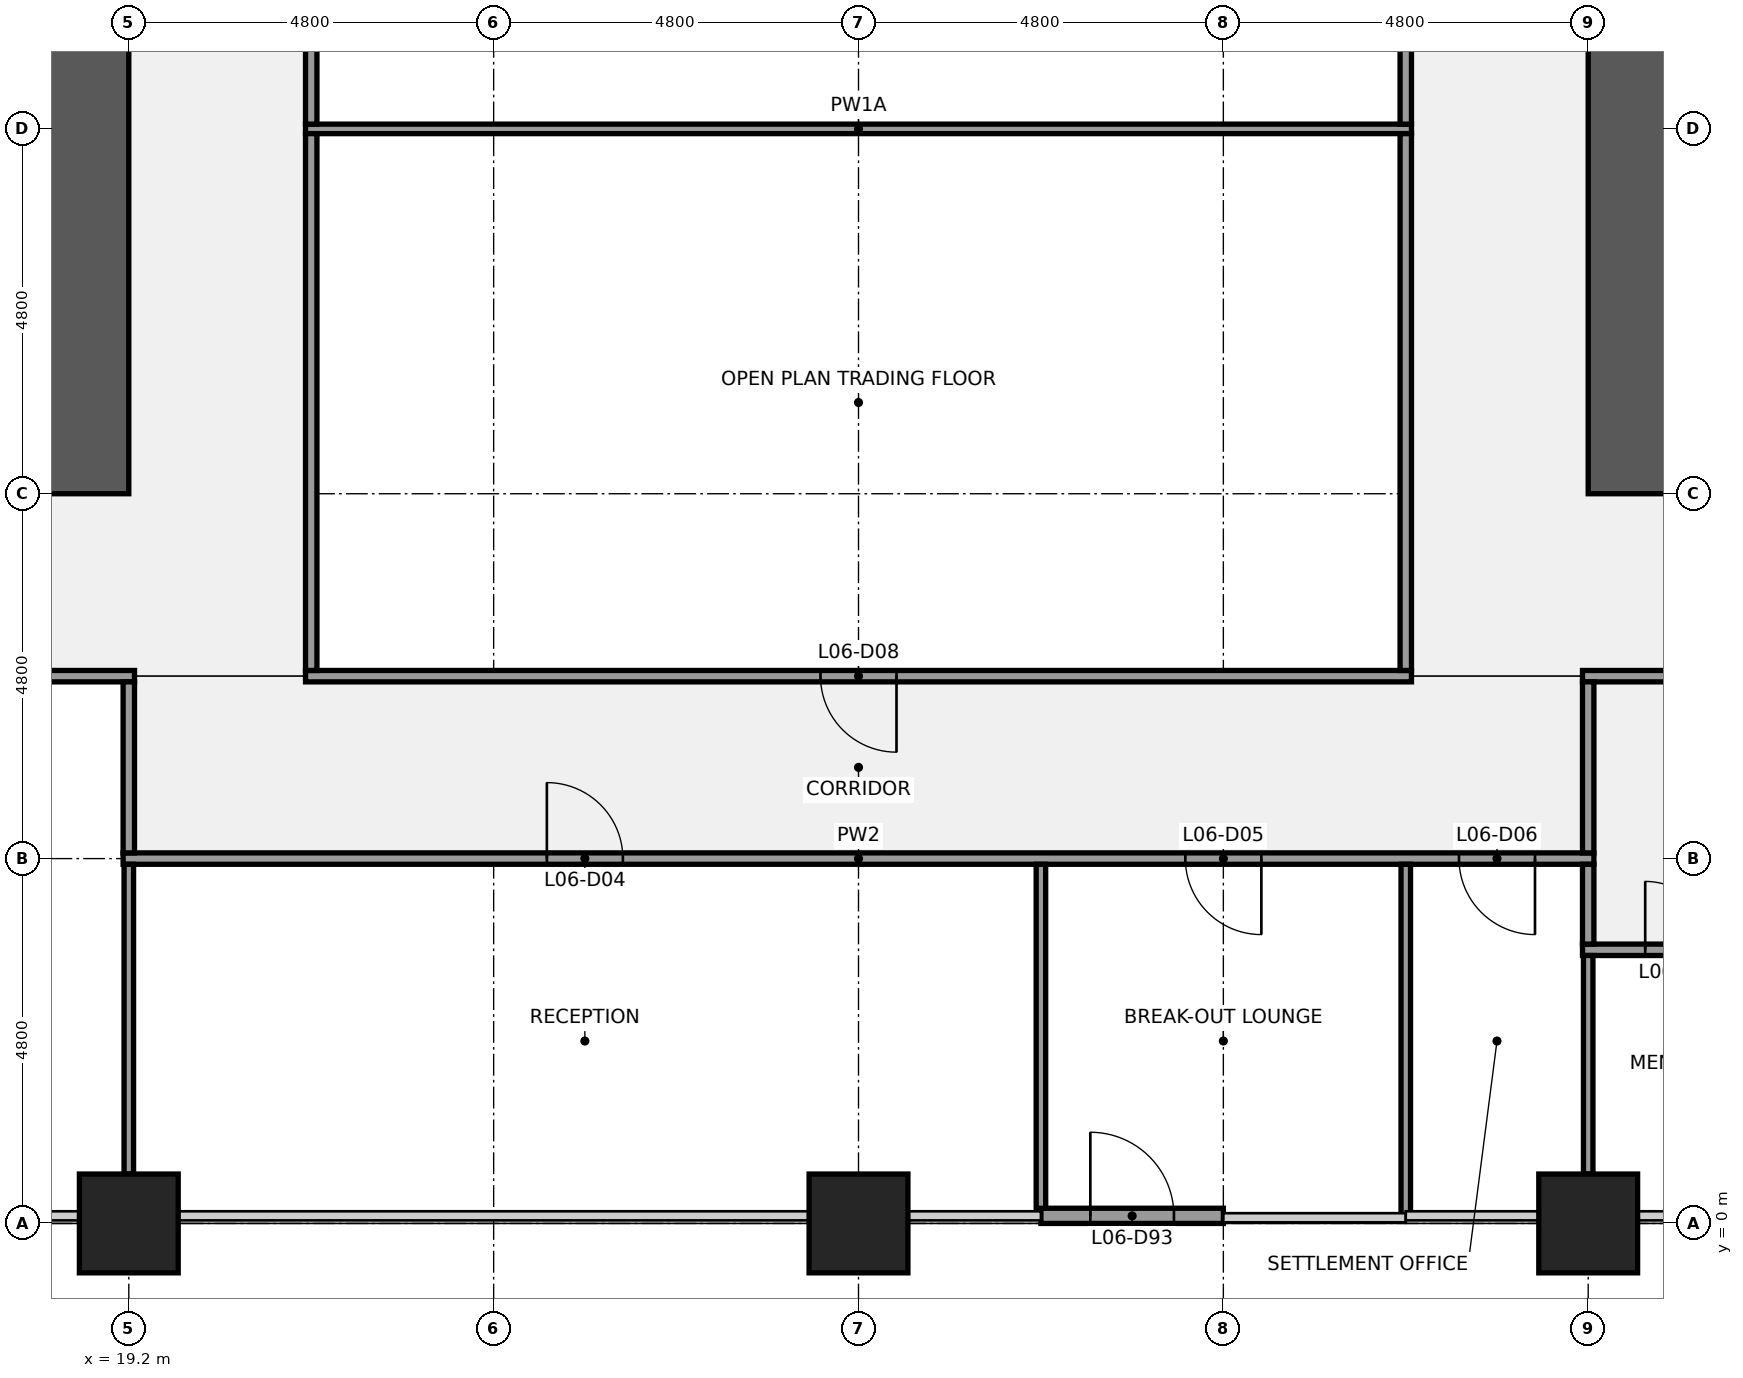
"""IFC4 building model, lengths in metres.
Left out: names, types, materials, properties, quantities, classifications, styles, units other than length and angle.
Written with IfcOpenShell. Run it as: python <this file> out.ifc"""

import sys

from ifc_helpers import new_model, si_unit, direction, frame, frame_2d, origin, origin_2d, place, context, subcontext, project, spatial, rectangle, extrude, element, fill, save


model = new_model("IFC4")
c1 = context("Model", 3, precision=1e-05, world=origin(), true_north=direction((0.0, 1.0)))
c2 = subcontext(c1, "Body", "Model", "MODEL_VIEW")
j1 = project(units=[si_unit("LENGTHUNIT", "METRE"), si_unit("PLANEANGLEUNIT", "RADIAN")], contexts=[c1])
p1 = place(None, origin())
s1 = spatial("IfcSite", under=j1, at=p1, CompositionType="ELEMENT")
p2 = place(p1, origin())
s2 = spatial("IfcBuilding", under=s1, at=p2, CompositionType="ELEMENT")
p3 = place(p2, frame((0.0, 0.0, 34.6)))
s3 = spatial("IfcBuildingStorey", under=s2, at=p3, CompositionType="ELEMENT", Elevation=34.6)
for number, where, z_axis, x_axis in (
    (1, (19.2, 0.0, 0.0), (0.0, 0.0, 1.0), (1.0, 0.0, 0.0)),
    (2, (28.8, 0.0, 0.0), (0.0, 0.0, 1.0), (1.0, 0.0, 0.0)),
    (3, (38.4, 0.0, 0.0), (0.0, 0.0, 1.0), (1.0, 0.0, 0.0)),
):
    element("IfcColumn", number, at=place(p3, frame(where, z_axis=z_axis, x_axis=x_axis)), inside=s3, PredefinedType="COLUMN", context=c2, shape_type="SweptSolid", body=[
        extrude(rectangle(XDim=1.3, YDim=1.3, at=origin_2d()), origin(), (0.0, 0.0, 1.0), 4.4),
    ])
p4 = place(p3, frame((18.6, 38.4, 0.0), z_axis=(0.0, 0.0, 1.0), x_axis=(0.0, -1.0, 0.0)))
e4 = element("IfcWall", 4, at=p4, inside=s3, PredefinedType="SHEAR", context=c2, shape_type="SweptSolid", body=[
    extrude(rectangle(XDim=28.8, YDim=1.2, at=frame_2d((14.4, 0.0))), origin(), (0.0, 0.0, 1.0), 4.24),
])
p5 = place(p4, frame((18.3, 0.0, 0.0)))
e5 = element("IfcOpeningElement", 5, at=p5, cuts=e4, PredefinedType="OPENING", context=c2, shape_type="SweptSolid", body=[
    extrude(rectangle(XDim=1.8, YDim=2.1, at=frame_2d((0.9, 1.05))), frame((0.0, 0.61, 0.0), z_axis=(0.0, -1.0, 0.0), x_axis=(1.0, 0.0, 0.0)), (0.0, 0.0, 1.0), 1.22),
])
p6 = place(p4, frame((8.7, 0.0, 0.0)))
e6 = element("IfcOpeningElement", 6, at=p6, cuts=e4, PredefinedType="OPENING", context=c2, shape_type="SweptSolid", body=[
    extrude(rectangle(XDim=1.8, YDim=2.1, at=frame_2d((0.9, 1.05))), frame((0.0, 0.61, 0.0), z_axis=(0.0, -1.0, 0.0), x_axis=(1.0, 0.0, 0.0)), (0.0, 0.0, 1.0), 1.22),
])
p7 = place(p3, frame((39.0, 9.6, 0.0), z_axis=(0.0, 0.0, 1.0), x_axis=(0.0, 1.0, 0.0)))
e7 = element("IfcWall", 7, at=p7, inside=s3, PredefinedType="SHEAR", context=c2, shape_type="SweptSolid", body=[
    extrude(rectangle(XDim=28.8, YDim=1.2, at=frame_2d((14.4, 0.0))), origin(), (0.0, 0.0, 1.0), 4.24),
])
p8 = place(p7, frame((8.7, 0.0, 0.0)))
e8 = element("IfcOpeningElement", 8, at=p8, cuts=e7, PredefinedType="OPENING", context=c2, shape_type="SweptSolid", body=[
    extrude(rectangle(XDim=1.8, YDim=2.1, at=frame_2d((0.9, 1.05))), frame((0.0, 0.61, 0.0), z_axis=(0.0, -1.0, 0.0), x_axis=(1.0, 0.0, 0.0)), (0.0, 0.0, 1.0), 1.22),
])
p9 = place(p7, frame((18.3, 0.0, 0.0)))
e9 = element("IfcOpeningElement", 9, at=p9, cuts=e7, PredefinedType="OPENING", context=c2, shape_type="SweptSolid", body=[
    extrude(rectangle(XDim=1.8, YDim=2.1, at=frame_2d((0.9, 1.05))), frame((0.0, 0.61, 0.0), z_axis=(0.0, -1.0, 0.0), x_axis=(1.0, 0.0, 0.0)), (0.0, 0.0, 1.0), 1.22),
])
p10 = place(p3, frame((38.325, 3.6, 0.0), z_axis=(0.0, 0.0, 1.0), x_axis=(1.0, 0.0, 0.0)))
e10 = element("IfcWall", 10, at=p10, inside=s3, PredefinedType="PARTITIONING", context=c2, shape_type="SweptSolid", body=[
    extrude(rectangle(XDim=7.35, YDim=0.15, at=frame_2d((3.675, 0.0))), origin(), (0.0, 0.0, 1.0), 3.27),
])
p11 = place(p10, frame((0.825, 0.0, 0.0)))
e11 = element("IfcOpeningElement", 11, at=p11, cuts=e10, PredefinedType="OPENING", context=c2, shape_type="SweptSolid", body=[
    extrude(rectangle(XDim=0.9, YDim=2.1, at=frame_2d((0.45, 1.05))), frame((0.0, 0.085, 0.0), z_axis=(0.0, -1.0, 0.0), x_axis=(1.0, 0.0, 0.0)), (0.0, 0.0, 1.0), 0.17),
])
p12 = place(p10, frame((3.225, 0.0, 0.0)))
e12 = element("IfcOpeningElement", 12, at=p12, cuts=e10, PredefinedType="OPENING", context=c2, shape_type="SweptSolid", body=[
    extrude(rectangle(XDim=0.9, YDim=2.1, at=frame_2d((0.45, 1.05))), frame((0.0, 0.085, 0.0), z_axis=(0.0, -1.0, 0.0), x_axis=(1.0, 0.0, 0.0)), (0.0, 0.0, 1.0), 0.17),
])
p13 = place(p10, frame((5.475, 0.0, 0.0)))
e13 = element("IfcOpeningElement", 13, at=p13, cuts=e10, PredefinedType="OPENING", context=c2, shape_type="SweptSolid", body=[
    extrude(rectangle(XDim=1.2, YDim=2.1, at=frame_2d((0.6, 1.05))), frame((0.0, 0.085, 0.0), z_axis=(0.0, -1.0, 0.0), x_axis=(1.0, 0.0, 0.0)), (0.0, 0.0, 1.0), 0.17),
])
p14 = place(p3, frame((19.125, 4.8, 0.0), z_axis=(0.0, 0.0, 1.0), x_axis=(1.0, 0.0, 0.0)))
e14 = element("IfcWall", 14, at=p14, inside=s3, PredefinedType="PARTITIONING", context=c2, shape_type="SweptSolid", body=[
    extrude(rectangle(XDim=19.35, YDim=0.15, at=frame_2d((9.675, 0.0))), origin(), (0.0, 0.0, 1.0), 3.27),
])
p15 = place(p14, frame((5.575, 0.0, 0.0)))
e15 = element("IfcOpeningElement", 15, at=p15, cuts=e14, PredefinedType="OPENING", context=c2, shape_type="SweptSolid", body=[
    extrude(rectangle(XDim=1.0, YDim=2.1, at=frame_2d((0.5, 1.05))), frame((0.0, 0.085, 0.0), z_axis=(0.0, -1.0, 0.0), x_axis=(1.0, 0.0, 0.0)), (0.0, 0.0, 1.0), 0.17),
])
p16 = place(p14, frame((13.975, 0.0, 0.0)))
e16 = element("IfcOpeningElement", 16, at=p16, cuts=e14, PredefinedType="OPENING", context=c2, shape_type="SweptSolid", body=[
    extrude(rectangle(XDim=1.0, YDim=2.1, at=frame_2d((0.5, 1.05))), frame((0.0, 0.085, 0.0), z_axis=(0.0, -1.0, 0.0), x_axis=(1.0, 0.0, 0.0)), (0.0, 0.0, 1.0), 0.17),
])
p17 = place(p14, frame((17.575, 0.0, 0.0)))
e17 = element("IfcOpeningElement", 17, at=p17, cuts=e14, PredefinedType="OPENING", context=c2, shape_type="SweptSolid", body=[
    extrude(rectangle(XDim=1.0, YDim=2.1, at=frame_2d((0.5, 1.05))), frame((0.0, 0.085, 0.0), z_axis=(0.0, -1.0, 0.0), x_axis=(1.0, 0.0, 0.0)), (0.0, 0.0, 1.0), 0.17),
])
p18 = place(p3, frame((14.325, 7.2, 0.0), z_axis=(0.0, 0.0, 1.0), x_axis=(1.0, 0.0, 0.0)))
e18 = element("IfcWall", 18, at=p18, inside=s3, PredefinedType="PARTITIONING", context=c2, shape_type="SweptSolid", body=[
    extrude(rectangle(XDim=4.95, YDim=0.15, at=frame_2d((2.475, 0.0))), origin(), (0.0, 0.0, 1.0), 3.27),
])
p19 = place(p18, frame((1.975, 0.0, 0.0)))
e19 = element("IfcOpeningElement", 19, at=p19, cuts=e18, PredefinedType="OPENING", context=c2, shape_type="SweptSolid", body=[
    extrude(rectangle(XDim=1.0, YDim=2.1, at=frame_2d((0.5, 1.05))), frame((0.0, 0.085, 0.0), z_axis=(0.0, -1.0, 0.0), x_axis=(1.0, 0.0, 0.0)), (0.0, 0.0, 1.0), 0.17),
])
p20 = place(p3, frame((21.525, 7.2, 0.0), z_axis=(0.0, 0.0, 1.0), x_axis=(1.0, 0.0, 0.0)))
e20 = element("IfcWall", 20, at=p20, inside=s3, PredefinedType="PARTITIONING", context=c2, shape_type="SweptSolid", body=[
    extrude(rectangle(XDim=14.55, YDim=0.15, at=frame_2d((7.275, 0.0))), origin(), (0.0, 0.0, 1.0), 3.27),
])
p21 = place(p20, frame((6.775, 0.0, 0.0)))
e21 = element("IfcOpeningElement", 21, at=p21, cuts=e20, PredefinedType="OPENING", context=c2, shape_type="SweptSolid", body=[
    extrude(rectangle(XDim=1.0, YDim=2.1, at=frame_2d((0.5, 1.05))), frame((0.0, 0.085, 0.0), z_axis=(0.0, -1.0, 0.0), x_axis=(1.0, 0.0, 0.0)), (0.0, 0.0, 1.0), 0.17),
])
p22 = place(p3, frame((38.325, 7.2, 0.0), z_axis=(0.0, 0.0, 1.0), x_axis=(1.0, 0.0, 0.0)))
e22 = element("IfcWall", 22, at=p22, inside=s3, PredefinedType="PARTITIONING", context=c2, shape_type="SweptSolid", body=[
    extrude(rectangle(XDim=7.35, YDim=0.15, at=frame_2d((3.675, 0.0))), origin(), (0.0, 0.0, 1.0), 3.27),
])
p23 = place(p22, frame((1.975, 0.0, 0.0)))
e23 = element("IfcOpeningElement", 23, at=p23, cuts=e22, PredefinedType="OPENING", context=c2, shape_type="SweptSolid", body=[
    extrude(rectangle(XDim=1.0, YDim=2.1, at=frame_2d((0.5, 1.05))), frame((0.0, 0.085, 0.0), z_axis=(0.0, -1.0, 0.0), x_axis=(1.0, 0.0, 0.0)), (0.0, 0.0, 1.0), 0.17),
])
p24 = place(p3, frame((21.525, 14.4, 0.0), z_axis=(0.0, 0.0, 1.0), x_axis=(1.0, 0.0, 0.0)))
e24 = element("IfcWall", 24, at=p24, inside=s3, PredefinedType="PARTITIONING", context=c2, shape_type="SweptSolid", body=[
    extrude(rectangle(XDim=14.55, YDim=0.125, at=frame_2d((7.275, 0.0))), origin(), (0.0, 0.0, 1.0), 3.27),
])
p25 = place(p3, frame((19.2, 0.65, 0.0), z_axis=(0.0, 0.0, 1.0), x_axis=(0.0, 1.0, 0.0)))
e25 = element("IfcWall", 25, at=p25, inside=s3, PredefinedType="PARTITIONING", context=c2, shape_type="SweptSolid", body=[
    extrude(rectangle(XDim=4.075, YDim=0.125, at=frame_2d((2.038, 0.0))), origin(), (0.0, 0.0, 1.0), 3.27),
])
p26 = place(p3, frame((19.2, 4.875, 0.0), z_axis=(0.0, 0.0, 1.0), x_axis=(0.0, 1.0, 0.0)))
e26 = element("IfcWall", 26, at=p26, inside=s3, PredefinedType="PARTITIONING", context=c2, shape_type="SweptSolid", body=[
    extrude(rectangle(XDim=2.25, YDim=0.15, at=frame_2d((1.125, 0.0))), origin(), (0.0, 0.0, 1.0), 3.27),
])
p27 = place(p3, frame((21.6, 7.275, 0.0), z_axis=(0.0, 0.0, 1.0), x_axis=(0.0, 1.0, 0.0)))
e27 = element("IfcWall", 27, at=p27, inside=s3, PredefinedType="PARTITIONING", context=c2, shape_type="SweptSolid", body=[
    extrude(rectangle(XDim=7.062, YDim=0.15, at=frame_2d((3.531, 0.0))), origin(), (0.0, 0.0, 1.0), 3.27),
])
p28 = place(p3, frame((21.6, 14.462, 0.0), z_axis=(0.0, 0.0, 1.0), x_axis=(0.0, 1.0, 0.0)))
e28 = element("IfcWall", 28, at=p28, inside=s3, PredefinedType="PARTITIONING", context=c2, shape_type="SweptSolid", body=[
    extrude(rectangle(XDim=9.475, YDim=0.15, at=frame_2d((4.738, 0.0))), origin(), (0.0, 0.0, 1.0), 3.27),
])
p29 = place(p28, frame((4.238, 0.0, 0.0)))
e29 = element("IfcOpeningElement", 29, at=p29, cuts=e28, PredefinedType="OPENING", context=c2, shape_type="SweptSolid", body=[
    extrude(rectangle(XDim=1.0, YDim=2.1, at=frame_2d((0.5, 1.05))), frame((0.0, 0.085, 0.0), z_axis=(0.0, -1.0, 0.0), x_axis=(1.0, 0.0, 0.0)), (0.0, 0.0, 1.0), 0.17),
])
for number, where, z_axis, x_axis in (
    (30, (31.2, 0.1, 0.0), (0.0, 0.0, 1.0), (0.0, 1.0, 0.0)),
    (31, (36.0, 0.1, 0.0), (0.0, 0.0, 1.0), (0.0, 1.0, 0.0)),
):
    element("IfcWall", number, at=place(p3, frame(where, z_axis=z_axis, x_axis=x_axis)), inside=s3, PredefinedType="PARTITIONING", context=c2, shape_type="SweptSolid", body=[
        extrude(rectangle(XDim=4.625, YDim=0.125, at=frame_2d((2.312, 0.0))), origin(), (0.0, 0.0, 1.0), 3.27),
    ])
p30 = place(p3, frame((36.0, 7.275, 0.0), z_axis=(0.0, 0.0, 1.0), x_axis=(0.0, 1.0, 0.0)))
e32 = element("IfcWall", 32, at=p30, inside=s3, PredefinedType="PARTITIONING", context=c2, shape_type="SweptSolid", body=[
    extrude(rectangle(XDim=7.062, YDim=0.15, at=frame_2d((3.531, 0.0))), origin(), (0.0, 0.0, 1.0), 3.27),
])
p31 = place(p3, frame((36.0, 14.462, 0.0), z_axis=(0.0, 0.0, 1.0), x_axis=(0.0, 1.0, 0.0)))
e33 = element("IfcWall", 33, at=p31, inside=s3, PredefinedType="PARTITIONING", context=c2, shape_type="SweptSolid", body=[
    extrude(rectangle(XDim=9.475, YDim=0.15, at=frame_2d((4.738, 0.0))), origin(), (0.0, 0.0, 1.0), 3.27),
])
p32 = place(p3, frame((38.4, 0.65, 0.0), z_axis=(0.0, 0.0, 1.0), x_axis=(0.0, 1.0, 0.0)))
e34 = element("IfcWall", 34, at=p32, inside=s3, PredefinedType="PARTITIONING", context=c2, shape_type="SweptSolid", body=[
    extrude(rectangle(XDim=2.875, YDim=0.125, at=frame_2d((1.438, 0.0))), origin(), (0.0, 0.0, 1.0), 3.27),
])
p33 = place(p3, frame((38.4, 3.675, 0.0), z_axis=(0.0, 0.0, 1.0), x_axis=(0.0, 1.0, 0.0)))
e35 = element("IfcWall", 35, at=p33, inside=s3, PredefinedType="PARTITIONING", context=c2, shape_type="SweptSolid", body=[
    extrude(rectangle(XDim=1.05, YDim=0.15, at=frame_2d((0.525, 0.0))), origin(), (0.0, 0.0, 1.0), 3.27),
])
p34 = place(p3, frame((38.4, 4.875, 0.0), z_axis=(0.0, 0.0, 1.0), x_axis=(0.0, 1.0, 0.0)))
e36 = element("IfcWall", 36, at=p34, inside=s3, PredefinedType="PARTITIONING", context=c2, shape_type="SweptSolid", body=[
    extrude(rectangle(XDim=2.25, YDim=0.15, at=frame_2d((1.125, 0.0))), origin(), (0.0, 0.0, 1.0), 3.27),
])
p35 = place(p3, frame((31.2, 0.1, 0.0), z_axis=(0.0, 0.0, 1.0), x_axis=(1.0, 0.0, 0.0)))
e37 = element("IfcWall", 37, at=p35, inside=s3, PredefinedType="SOLIDWALL", context=c2, shape_type="SweptSolid", body=[
    extrude(rectangle(XDim=2.4, YDim=0.2, at=frame_2d((1.2, 0.0))), origin(), (0.0, 0.0, 1.0), 3.714),
])
p36 = place(p35, frame((0.65, 0.0, 0.0)))
e38 = element("IfcOpeningElement", 38, at=p36, cuts=e37, PredefinedType="OPENING", context=c2, shape_type="SweptSolid", body=[
    extrude(rectangle(XDim=1.1, YDim=2.1, at=frame_2d((0.55, 1.05))), frame((0.0, 0.11, 0.0), z_axis=(0.0, -1.0, 0.0), x_axis=(1.0, 0.0, 0.0)), (0.0, 0.0, 1.0), 0.22),
])
for number, where, z_axis, x_axis in (
    (39, (19.2, -1.075, 0.0), (0.0, 0.0, 1.0), (1.0, 0.0, 0.0)),
    (40, (38.4, -1.075, 0.0), (0.0, 0.0, 1.0), (1.0, 0.0, 0.0)),
):
    element("IfcColumn", number, at=place(p3, frame(where, z_axis=z_axis, x_axis=x_axis)), inside=s3, PredefinedType="PILASTER", context=c2, shape_type="SweptSolid", body=[
        extrude(rectangle(XDim=4.2, YDim=0.85, at=origin_2d()), origin(), (0.0, 0.0, 1.0), 4.4),
    ])
p37 = place(p11, origin())
e41 = element("IfcDoor", 41, at=p37, inside=s3, OperationType="SINGLE_SWING_LEFT", PredefinedType="DOOR", context=c2, shape_type="SweptSolid", body=[
    extrude(rectangle(XDim=0.9, YDim=2.1, at=frame_2d((0.45, 1.05))), frame((0.0, 0.025, 0.0), z_axis=(0.0, -1.0, 0.0), x_axis=(1.0, 0.0, 0.0)), (0.0, 0.0, 1.0), 0.05),
])
fill(e11, e41)
p38 = place(p15, origin())
e42 = element("IfcDoor", 42, at=p38, inside=s3, OperationType="SINGLE_SWING_LEFT", PredefinedType="DOOR", context=c2, shape_type="SweptSolid", body=[
    extrude(rectangle(XDim=1.0, YDim=2.1, at=frame_2d((0.5, 1.05))), frame((0.0, 0.025, 0.0), z_axis=(0.0, -1.0, 0.0), x_axis=(1.0, 0.0, 0.0)), (0.0, 0.0, 1.0), 0.05),
])
fill(e15, e42)
p39 = place(p16, origin())
e43 = element("IfcDoor", 43, at=p39, inside=s3, OperationType="SINGLE_SWING_RIGHT", PredefinedType="DOOR", context=c2, shape_type="SweptSolid", body=[
    extrude(rectangle(XDim=1.0, YDim=2.1, at=frame_2d((0.5, 1.05))), frame((0.0, 0.025, 0.0), z_axis=(0.0, -1.0, 0.0), x_axis=(1.0, 0.0, 0.0)), (0.0, 0.0, 1.0), 0.05),
])
fill(e16, e43)
p40 = place(p17, origin())
e44 = element("IfcDoor", 44, at=p40, inside=s3, OperationType="SINGLE_SWING_RIGHT", PredefinedType="DOOR", context=c2, shape_type="SweptSolid", body=[
    extrude(rectangle(XDim=1.0, YDim=2.1, at=frame_2d((0.5, 1.05))), frame((0.0, 0.025, 0.0), z_axis=(0.0, -1.0, 0.0), x_axis=(1.0, 0.0, 0.0)), (0.0, 0.0, 1.0), 0.05),
])
fill(e17, e44)
p41 = place(p21, origin())
e45 = element("IfcDoor", 45, at=p41, inside=s3, OperationType="SINGLE_SWING_RIGHT", PredefinedType="DOOR", context=c2, shape_type="SweptSolid", body=[
    extrude(rectangle(XDim=1.0, YDim=2.1, at=frame_2d((0.5, 1.05))), frame((0.0, 0.025, 0.0), z_axis=(0.0, -1.0, 0.0), x_axis=(1.0, 0.0, 0.0)), (0.0, 0.0, 1.0), 0.05),
])
fill(e21, e45)
p42 = place(p36, origin())
e46 = element("IfcDoor", 46, at=p42, inside=s3, OperationType="SINGLE_SWING_LEFT", PredefinedType="DOOR", context=c2, shape_type="SweptSolid", body=[
    extrude(rectangle(XDim=1.1, YDim=2.1, at=frame_2d((0.55, 1.05))), frame((0.0, 0.025, 0.0), z_axis=(0.0, -1.0, 0.0), x_axis=(1.0, 0.0, 0.0)), (0.0, 0.0, 1.0), 0.05),
])
fill(e38, e46)
save(model, sys.argv[1])
